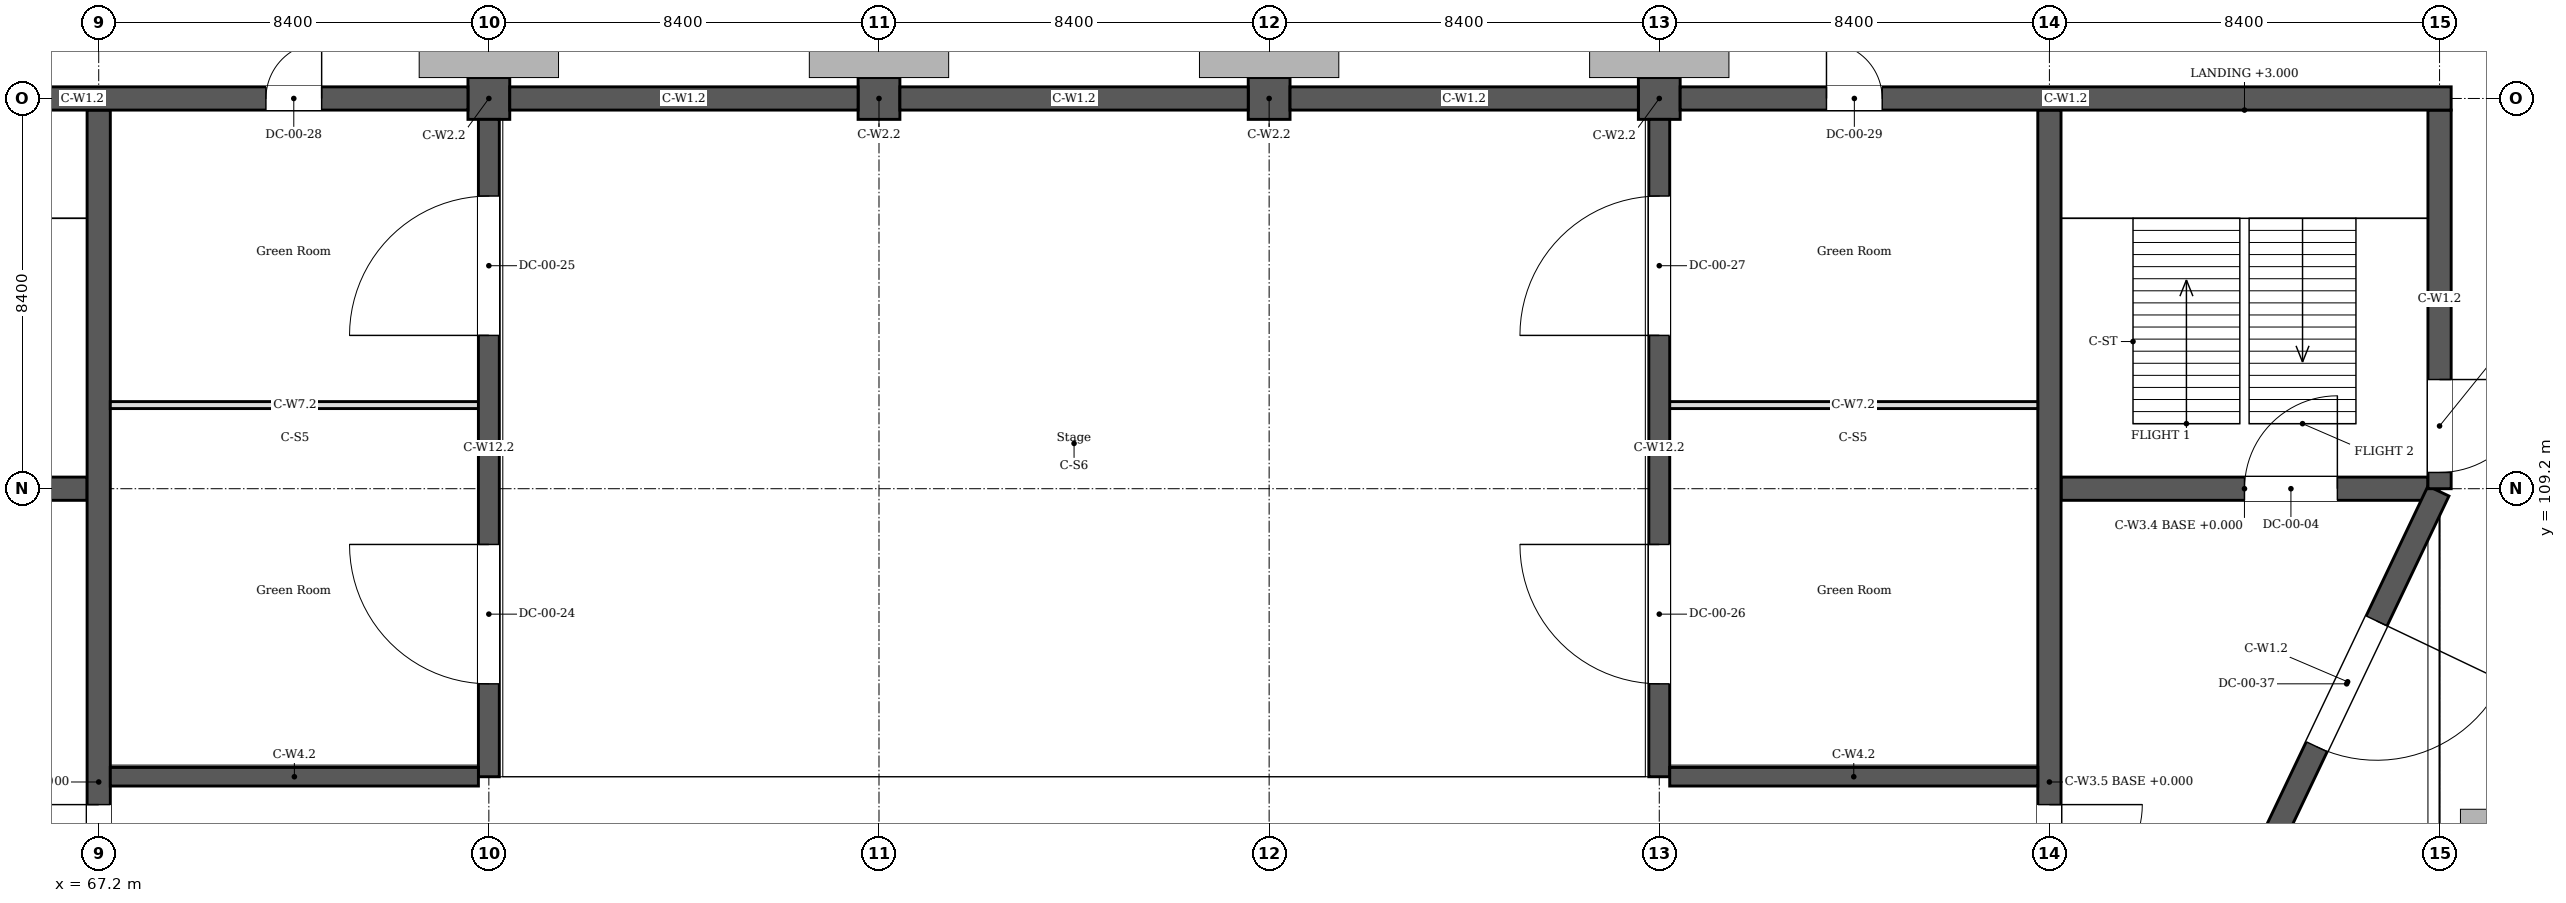
"""IFC4 building model, lengths in metres.
Left out: names, types, materials, properties, quantities, classifications, styles, units other than length and angle.
Written with IfcOpenShell. Run it as: python <this file> out.ifc"""

import sys

from ifc_helpers import new_model, si_unit, direction, frame, frame_2d, origin, place, context, subcontext, project, spatial, rectangle, extrude, element, fill, save


model = new_model("IFC4")
c1 = context("Model", 3, precision=1e-05, world=origin(), true_north=direction((0.0, 1.0)))
c2 = subcontext(c1, "Body", "Model", "MODEL_VIEW")
j1 = project(units=[si_unit("LENGTHUNIT", "METRE"), si_unit("PLANEANGLEUNIT", "RADIAN")], contexts=[c1])
p1 = place(None, origin())
s1 = spatial("IfcSite", under=j1, at=p1, CompositionType="ELEMENT")
p2 = place(p1, origin())
s2 = spatial("IfcBuilding", under=s1, at=p2, CompositionType="ELEMENT")
p3 = place(p2, origin())
s3 = spatial("IfcBuildingStorey", under=s2, at=p3, CompositionType="ELEMENT", Elevation=0.0)
p4 = place(p3, frame((117.576, 109.15, 0.0), z_axis=(0.0, 0.0, 1.0), x_axis=(-0.429931496654, -0.902861511077, 0.0)))
e1 = element("IfcWall", 1, at=p4, inside=s3, PredefinedType="SOLIDWALL", context=c2, shape_type="SweptSolid", body=[
    extrude(rectangle(XDim=9.096, YDim=0.5, at=frame_2d((4.548, 0.0))), origin(), (0.0, 0.0, 1.0), 6.0),
])
p5 = place(p4, frame((3.096, 0.0, 0.0)))
e2 = element("IfcOpeningElement", 2, at=p5, cuts=e1, PredefinedType="OPENING", context=c2, shape_type="SweptSolid", body=[
    extrude(rectangle(XDim=3.0, YDim=2.1, at=frame_2d((1.5, 1.05))), frame((0.0, 0.26, 0.0), z_axis=(0.0, -1.0, 0.0), x_axis=(1.0, 0.0, 0.0)), (0.0, 0.0, 1.0), 0.52),
])
p6 = place(p3, frame((117.6, 117.35, 0.0), z_axis=(0.0, 0.0, 1.0), x_axis=(0.0, -1.0, 0.0)))
e3 = element("IfcWall", 3, at=p6, inside=s3, PredefinedType="SOLIDWALL", context=c2, shape_type="SweptSolid", body=[
    extrude(rectangle(XDim=8.15, YDim=0.5, at=frame_2d((4.075, 0.0))), origin(), (0.0, 0.0, 1.0), 6.0),
])
p7 = place(p6, frame((5.8, 0.0, 0.0)))
e4 = element("IfcOpeningElement", 4, at=p7, cuts=e3, PredefinedType="OPENING", context=c2, shape_type="SweptSolid", body=[
    extrude(rectangle(XDim=2.0, YDim=2.1, at=frame_2d((1.0, 1.05))), frame((0.0, 0.26, 0.0), z_axis=(0.0, -1.0, 0.0), x_axis=(1.0, 0.0, 0.0)), (0.0, 0.0, 1.0), 0.52),
])
p8 = place(p3, frame((101.25, 117.6, 0.0), z_axis=(0.0, 0.0, 1.0), x_axis=(1.0, 0.0, 0.0)))
e5 = element("IfcWall", 5, at=p8, inside=s3, PredefinedType="SOLIDWALL", context=c2, shape_type="SweptSolid", body=[
    extrude(rectangle(XDim=16.6, YDim=0.5, at=frame_2d((8.3, 0.0))), origin(), (0.0, 0.0, 1.0), 6.0),
])
p9 = place(p8, frame((3.15, 0.0, 0.0)))
e6 = element("IfcOpeningElement", 6, at=p9, cuts=e5, PredefinedType="OPENING", context=c2, shape_type="SweptSolid", body=[
    extrude(rectangle(XDim=1.2, YDim=2.1, at=frame_2d((0.6, 1.05))), frame((0.0, 0.26, 0.0), z_axis=(0.0, -1.0, 0.0), x_axis=(1.0, 0.0, 0.0)), (0.0, 0.0, 1.0), 0.52),
])
for number, where, z_axis, x_axis in (
    (7, (92.85, 117.6, 0.0), (0.0, 0.0, 1.0), (1.0, 0.0, 0.0)),
    (8, (84.45, 117.6, 0.0), (0.0, 0.0, 1.0), (1.0, 0.0, 0.0)),
    (9, (76.05, 117.6, 0.0), (0.0, 0.0, 1.0), (1.0, 0.0, 0.0)),
):
    element("IfcWall", number, at=place(p3, frame(where, z_axis=z_axis, x_axis=x_axis)), inside=s3, PredefinedType="SOLIDWALL", context=c2, shape_type="SweptSolid", body=[
        extrude(rectangle(XDim=7.5, YDim=0.5, at=frame_2d((3.75, 0.0))), origin(), (0.0, 0.0, 1.0), 6.0),
    ])
p10 = place(p3, frame((58.55, 117.6, 0.0), z_axis=(0.0, 0.0, 1.0), x_axis=(1.0, 0.0, 0.0)))
e10 = element("IfcWall", 10, at=p10, inside=s3, PredefinedType="SOLIDWALL", context=c2, shape_type="SweptSolid", body=[
    extrude(rectangle(XDim=16.6, YDim=0.5, at=frame_2d((8.3, 0.0))), origin(), (0.0, 0.0, 1.0), 6.0),
])
p11 = place(p10, frame((12.25, 0.0, 0.0)))
e11 = element("IfcOpeningElement", 11, at=p11, cuts=e10, PredefinedType="OPENING", context=c2, shape_type="SweptSolid", body=[
    extrude(rectangle(XDim=1.2, YDim=2.1, at=frame_2d((0.6, 1.05))), frame((0.0, 0.26, 0.0), z_axis=(0.0, -1.0, 0.0), x_axis=(1.0, 0.0, 0.0)), (0.0, 0.0, 1.0), 0.52),
])
p12 = place(p3, frame((101.25, 117.6, 0.0), z_axis=(0.0, 0.0, 1.0), x_axis=(-1.0, 0.0, 0.0)))
e12 = element("IfcWall", 12, at=p12, inside=s3, PredefinedType="SOLIDWALL", context=c2, shape_type="SweptSolid", body=[
    extrude(rectangle(XDim=0.9, YDim=0.9, at=frame_2d((0.45, 0.0))), origin(), (0.0, 0.0, 1.0), 6.0),
])
p13 = place(p3, frame((92.85, 117.6, 0.0), z_axis=(0.0, 0.0, 1.0), x_axis=(-1.0, 0.0, 0.0)))
e13 = element("IfcWall", 13, at=p13, inside=s3, PredefinedType="SOLIDWALL", context=c2, shape_type="SweptSolid", body=[
    extrude(rectangle(XDim=0.9, YDim=0.9, at=frame_2d((0.45, 0.0))), origin(), (0.0, 0.0, 1.0), 6.0),
])
p14 = place(p3, frame((84.45, 117.6, 0.0), z_axis=(0.0, 0.0, 1.0), x_axis=(-1.0, 0.0, 0.0)))
e14 = element("IfcWall", 14, at=p14, inside=s3, PredefinedType="SOLIDWALL", context=c2, shape_type="SweptSolid", body=[
    extrude(rectangle(XDim=0.9, YDim=0.9, at=frame_2d((0.45, 0.0))), origin(), (0.0, 0.0, 1.0), 6.0),
])
p15 = place(p3, frame((76.05, 117.6, 0.0), z_axis=(0.0, 0.0, 1.0), x_axis=(-1.0, 0.0, 0.0)))
e15 = element("IfcWall", 15, at=p15, inside=s3, PredefinedType="SOLIDWALL", context=c2, shape_type="SweptSolid", body=[
    extrude(rectangle(XDim=0.9, YDim=0.9, at=frame_2d((0.45, 0.0))), origin(), (0.0, 0.0, 1.0), 6.0),
])
p16 = place(p3, frame((67.2, 75.85, 0.0), z_axis=(0.0, 0.0, 1.0), x_axis=(0.0, 1.0, 0.0)))
e16 = element("IfcWall", 16, at=p16, inside=s3, PredefinedType="SOLIDWALL", context=c2, shape_type="SweptSolid", body=[
    extrude(rectangle(XDim=41.5, YDim=0.5, at=frame_2d((20.75, 0.0))), origin(), (0.0, 0.0, 1.0), 6.0),
])
p17 = place(p16, frame((24.55, 0.0, 0.0)))
e17 = element("IfcOpeningElement", 17, at=p17, cuts=e16, PredefinedType="OPENING", context=c2, shape_type="SweptSolid", body=[
    extrude(rectangle(XDim=2.0, YDim=2.4, at=frame_2d((1.0, 1.2))), frame((0.0, 0.26, 0.0), z_axis=(0.0, -1.0, 0.0), x_axis=(1.0, 0.0, 0.0)), (0.0, 0.0, 1.0), 0.52),
])
p18 = place(p3, frame((109.2, 117.35, 0.0), z_axis=(0.0, 0.0, 1.0), x_axis=(0.0, -1.0, 0.0)))
e18 = element("IfcWall", 18, at=p18, inside=s3, PredefinedType="SOLIDWALL", context=c2, shape_type="SweptSolid", body=[
    extrude(rectangle(XDim=41.5, YDim=0.5, at=frame_2d((20.75, 0.0))), origin(), (0.0, 0.0, 1.0), 6.0),
])
p19 = place(p18, frame((14.95, 0.0, 0.0)))
e19 = element("IfcOpeningElement", 19, at=p19, cuts=e18, PredefinedType="OPENING", context=c2, shape_type="SweptSolid", body=[
    extrude(rectangle(XDim=2.0, YDim=2.4, at=frame_2d((1.0, 1.2))), frame((0.0, 0.26, 0.0), z_axis=(0.0, -1.0, 0.0), x_axis=(1.0, 0.0, 0.0)), (0.0, 0.0, 1.0), 0.52),
])
p20 = place(p3, frame((75.6, 103.0, 0.0), z_axis=(0.0, 0.0, 1.0), x_axis=(0.0, 1.0, 0.0)))
e20 = element("IfcWall", 20, at=p20, inside=s3, PredefinedType="SOLIDWALL", context=c2, shape_type="SweptSolid", body=[
    extrude(rectangle(XDim=14.15, YDim=0.45, at=frame_2d((7.075, 0.0))), origin(), (0.0, 0.0, 1.0), 6.0),
])
p21 = place(p20, frame((2.0, 0.0, 0.0)))
e21 = element("IfcOpeningElement", 21, at=p21, cuts=e20, PredefinedType="OPENING", context=c2, shape_type="SweptSolid", body=[
    extrude(rectangle(XDim=3.0, YDim=2.4, at=frame_2d((1.5, 1.2))), frame((0.0, 0.235, 0.0), z_axis=(0.0, -1.0, 0.0), x_axis=(1.0, 0.0, 0.0)), (0.0, 0.0, 1.0), 0.47),
])
p22 = place(p20, frame((9.5, 0.0, 0.0)))
e22 = element("IfcOpeningElement", 22, at=p22, cuts=e20, PredefinedType="OPENING", context=c2, shape_type="SweptSolid", body=[
    extrude(rectangle(XDim=3.0, YDim=2.4, at=frame_2d((1.5, 1.2))), frame((0.0, 0.235, 0.0), z_axis=(0.0, -1.0, 0.0), x_axis=(1.0, 0.0, 0.0)), (0.0, 0.0, 1.0), 0.47),
])
p23 = place(p3, frame((100.8, 103.0, 0.0), z_axis=(0.0, 0.0, 1.0), x_axis=(0.0, 1.0, 0.0)))
e23 = element("IfcWall", 23, at=p23, inside=s3, PredefinedType="SOLIDWALL", context=c2, shape_type="SweptSolid", body=[
    extrude(rectangle(XDim=14.15, YDim=0.45, at=frame_2d((7.075, 0.0))), origin(), (0.0, 0.0, 1.0), 6.0),
])
p24 = place(p23, frame((2.0, 0.0, 0.0)))
e24 = element("IfcOpeningElement", 24, at=p24, cuts=e23, PredefinedType="OPENING", context=c2, shape_type="SweptSolid", body=[
    extrude(rectangle(XDim=3.0, YDim=2.4, at=frame_2d((1.5, 1.2))), frame((0.0, 0.235, 0.0), z_axis=(0.0, -1.0, 0.0), x_axis=(1.0, 0.0, 0.0)), (0.0, 0.0, 1.0), 0.47),
])
p25 = place(p23, frame((9.5, 0.0, 0.0)))
e25 = element("IfcOpeningElement", 25, at=p25, cuts=e23, PredefinedType="OPENING", context=c2, shape_type="SweptSolid", body=[
    extrude(rectangle(XDim=3.0, YDim=2.4, at=frame_2d((1.5, 1.2))), frame((0.0, 0.235, 0.0), z_axis=(0.0, -1.0, 0.0), x_axis=(1.0, 0.0, 0.0)), (0.0, 0.0, 1.0), 0.47),
])
for number, where, z_axis, x_axis in (
    (26, (67.45, 103.0, 0.0), (0.0, 0.0, 1.0), (1.0, 0.0, 0.0)),
    (27, (101.025, 103.0, 0.0), (0.0, 0.0, 1.0), (1.0, 0.0, 0.0)),
):
    element("IfcWall", number, at=place(p3, frame(where, z_axis=z_axis, x_axis=x_axis)), inside=s3, PredefinedType="SOLIDWALL", context=c2, shape_type="SweptSolid", body=[
        extrude(rectangle(XDim=7.925, YDim=0.4, at=frame_2d((3.962, 0.0))), origin(), (0.0, 0.0, 1.0), 6.0),
    ])
p26 = place(p3, frame((59.05, 109.2, 0.0), z_axis=(0.0, 0.0, 1.0), x_axis=(1.0, 0.0, 0.0)))
e28 = element("IfcWall", 28, at=p26, inside=s3, PredefinedType="SOLIDWALL", context=c2, shape_type="SweptSolid", body=[
    extrude(rectangle(XDim=7.9, YDim=0.5, at=frame_2d((3.95, 0.0))), origin(), (0.0, 0.0, 1.0), 6.0),
])
p27 = place(p26, frame((1.95, 0.0, 0.0)))
e29 = element("IfcOpeningElement", 29, at=p27, cuts=e28, PredefinedType="OPENING", context=c2, shape_type="SweptSolid", body=[
    extrude(rectangle(XDim=2.0, YDim=2.1, at=frame_2d((1.0, 1.05))), frame((0.0, 0.26, 0.0), z_axis=(0.0, -1.0, 0.0), x_axis=(1.0, 0.0, 0.0)), (0.0, 0.0, 1.0), 0.52),
])
p28 = place(p3, frame((109.45, 109.2, 0.0), z_axis=(0.0, 0.0, 1.0), x_axis=(1.0, 0.0, 0.0)))
e30 = element("IfcWall", 30, at=p28, inside=s3, PredefinedType="SOLIDWALL", context=c2, shape_type="SweptSolid", body=[
    extrude(rectangle(XDim=7.9, YDim=0.5, at=frame_2d((3.95, 0.0))), origin(), (0.0, 0.0, 1.0), 6.0),
])
p29 = place(p28, frame((3.95, 0.0, 0.0)))
e31 = element("IfcOpeningElement", 31, at=p29, cuts=e30, PredefinedType="OPENING", context=c2, shape_type="SweptSolid", body=[
    extrude(rectangle(XDim=2.0, YDim=2.1, at=frame_2d((1.0, 1.05))), frame((0.0, 0.26, 0.0), z_axis=(0.0, -1.0, 0.0), x_axis=(1.0, 0.0, 0.0)), (0.0, 0.0, 1.0), 0.52),
])
for number, where, z_axis, x_axis in (
    (32, (67.45, 111.0, 0.0), (0.0, 0.0, 1.0), (1.0, 0.0, 0.0)),
    (33, (101.0, 111.0, 0.0), (0.0, 0.0, 1.0), (1.0, 0.0, 0.0)),
):
    element("IfcWall", number, at=place(p3, frame(where, z_axis=z_axis, x_axis=x_axis)), inside=s3, PredefinedType="PARTITIONING", context=c2, shape_type="SweptSolid", body=[
        extrude(rectangle(XDim=7.95, YDim=0.15, at=frame_2d((3.975, 0.0))), origin(), (0.0, 0.0, 1.0), 5.35),
    ])
p30 = place(p29, origin())
e34 = element("IfcDoor", 34, at=p30, inside=s3, OperationType="DOUBLE_DOOR_DOUBLE_SWING", PredefinedType="DOOR", context=c2, shape_type="SweptSolid", body=[
    extrude(rectangle(XDim=2.0, YDim=2.1, at=frame_2d((1.0, 1.05))), frame((0.0, 0.025, 0.0), z_axis=(0.0, -1.0, 0.0), x_axis=(1.0, 0.0, 0.0)), (0.0, 0.0, 1.0), 0.05),
])
fill(e31, e34)
p31 = place(p7, origin())
e35 = element("IfcDoor", 35, at=p31, inside=s3, OperationType="DOUBLE_DOOR_DOUBLE_SWING", PredefinedType="DOOR", context=c2, shape_type="SweptSolid", body=[
    extrude(rectangle(XDim=2.0, YDim=2.1, at=frame_2d((1.0, 1.05))), frame((0.0, 0.025, 0.0), z_axis=(0.0, -1.0, 0.0), x_axis=(1.0, 0.0, 0.0)), (0.0, 0.0, 1.0), 0.05),
])
fill(e4, e35)
p32 = place(p17, origin())
e36 = element("IfcDoor", 36, at=p32, inside=s3, OperationType="DOUBLE_DOOR_DOUBLE_SWING", PredefinedType="DOOR", context=c2, shape_type="SweptSolid", body=[
    extrude(rectangle(XDim=2.0, YDim=2.4, at=frame_2d((1.0, 1.2))), frame((0.0, 0.025, 0.0), z_axis=(0.0, -1.0, 0.0), x_axis=(1.0, 0.0, 0.0)), (0.0, 0.0, 1.0), 0.05),
])
fill(e17, e36)
p33 = place(p19, origin())
e37 = element("IfcDoor", 37, at=p33, inside=s3, OperationType="DOUBLE_DOOR_DOUBLE_SWING", PredefinedType="DOOR", context=c2, shape_type="SweptSolid", body=[
    extrude(rectangle(XDim=2.0, YDim=2.4, at=frame_2d((1.0, 1.2))), frame((0.0, 0.025, 0.0), z_axis=(0.0, -1.0, 0.0), x_axis=(1.0, 0.0, 0.0)), (0.0, 0.0, 1.0), 0.05),
])
fill(e19, e37)
p34 = place(p21, origin())
e38 = element("IfcDoor", 38, at=p34, inside=s3, OperationType="DOUBLE_DOOR_DOUBLE_SWING", PredefinedType="DOOR", context=c2, shape_type="SweptSolid", body=[
    extrude(rectangle(XDim=3.0, YDim=2.4, at=frame_2d((1.5, 1.2))), frame((0.0, 0.025, 0.0), z_axis=(0.0, -1.0, 0.0), x_axis=(1.0, 0.0, 0.0)), (0.0, 0.0, 1.0), 0.05),
])
fill(e21, e38)
p35 = place(p22, origin())
e39 = element("IfcDoor", 39, at=p35, inside=s3, OperationType="DOUBLE_DOOR_DOUBLE_SWING", PredefinedType="DOOR", context=c2, shape_type="SweptSolid", body=[
    extrude(rectangle(XDim=3.0, YDim=2.4, at=frame_2d((1.5, 1.2))), frame((0.0, 0.025, 0.0), z_axis=(0.0, -1.0, 0.0), x_axis=(1.0, 0.0, 0.0)), (0.0, 0.0, 1.0), 0.05),
])
fill(e22, e39)
p36 = place(p24, origin())
e40 = element("IfcDoor", 40, at=p36, inside=s3, OperationType="DOUBLE_DOOR_DOUBLE_SWING", PredefinedType="DOOR", context=c2, shape_type="SweptSolid", body=[
    extrude(rectangle(XDim=3.0, YDim=2.4, at=frame_2d((1.5, 1.2))), frame((0.0, 0.025, 0.0), z_axis=(0.0, -1.0, 0.0), x_axis=(1.0, 0.0, 0.0)), (0.0, 0.0, 1.0), 0.05),
])
fill(e24, e40)
p37 = place(p25, origin())
e41 = element("IfcDoor", 41, at=p37, inside=s3, OperationType="DOUBLE_DOOR_DOUBLE_SWING", PredefinedType="DOOR", context=c2, shape_type="SweptSolid", body=[
    extrude(rectangle(XDim=3.0, YDim=2.4, at=frame_2d((1.5, 1.2))), frame((0.0, 0.025, 0.0), z_axis=(0.0, -1.0, 0.0), x_axis=(1.0, 0.0, 0.0)), (0.0, 0.0, 1.0), 0.05),
])
fill(e25, e41)
p38 = place(p11, origin())
e42 = element("IfcDoor", 42, at=p38, inside=s3, OperationType="SINGLE_SWING_LEFT", PredefinedType="DOOR", context=c2, shape_type="SweptSolid", body=[
    extrude(rectangle(XDim=1.2, YDim=2.1, at=frame_2d((0.6, 1.05))), frame((0.0, 0.025, 0.0), z_axis=(0.0, -1.0, 0.0), x_axis=(1.0, 0.0, 0.0)), (0.0, 0.0, 1.0), 0.05),
])
fill(e11, e42)
p39 = place(p9, origin())
e43 = element("IfcDoor", 43, at=p39, inside=s3, OperationType="SINGLE_SWING_LEFT", PredefinedType="DOOR", context=c2, shape_type="SweptSolid", body=[
    extrude(rectangle(XDim=1.2, YDim=2.1, at=frame_2d((0.6, 1.05))), frame((0.0, 0.025, 0.0), z_axis=(0.0, -1.0, 0.0), x_axis=(1.0, 0.0, 0.0)), (0.0, 0.0, 1.0), 0.05),
])
fill(e6, e43)
p40 = place(p5, origin())
e44 = element("IfcDoor", 44, at=p40, inside=s3, OperationType="DOUBLE_DOOR_DOUBLE_SWING", PredefinedType="DOOR", context=c2, shape_type="SweptSolid", body=[
    extrude(rectangle(XDim=3.0, YDim=2.1, at=frame_2d((1.5, 1.05))), frame((0.0, 0.025, 0.0), z_axis=(0.0, -1.0, 0.0), x_axis=(1.0, 0.0, 0.0)), (0.0, 0.0, 1.0), 0.05),
])
fill(e2, e44)
save(model, sys.argv[1])
